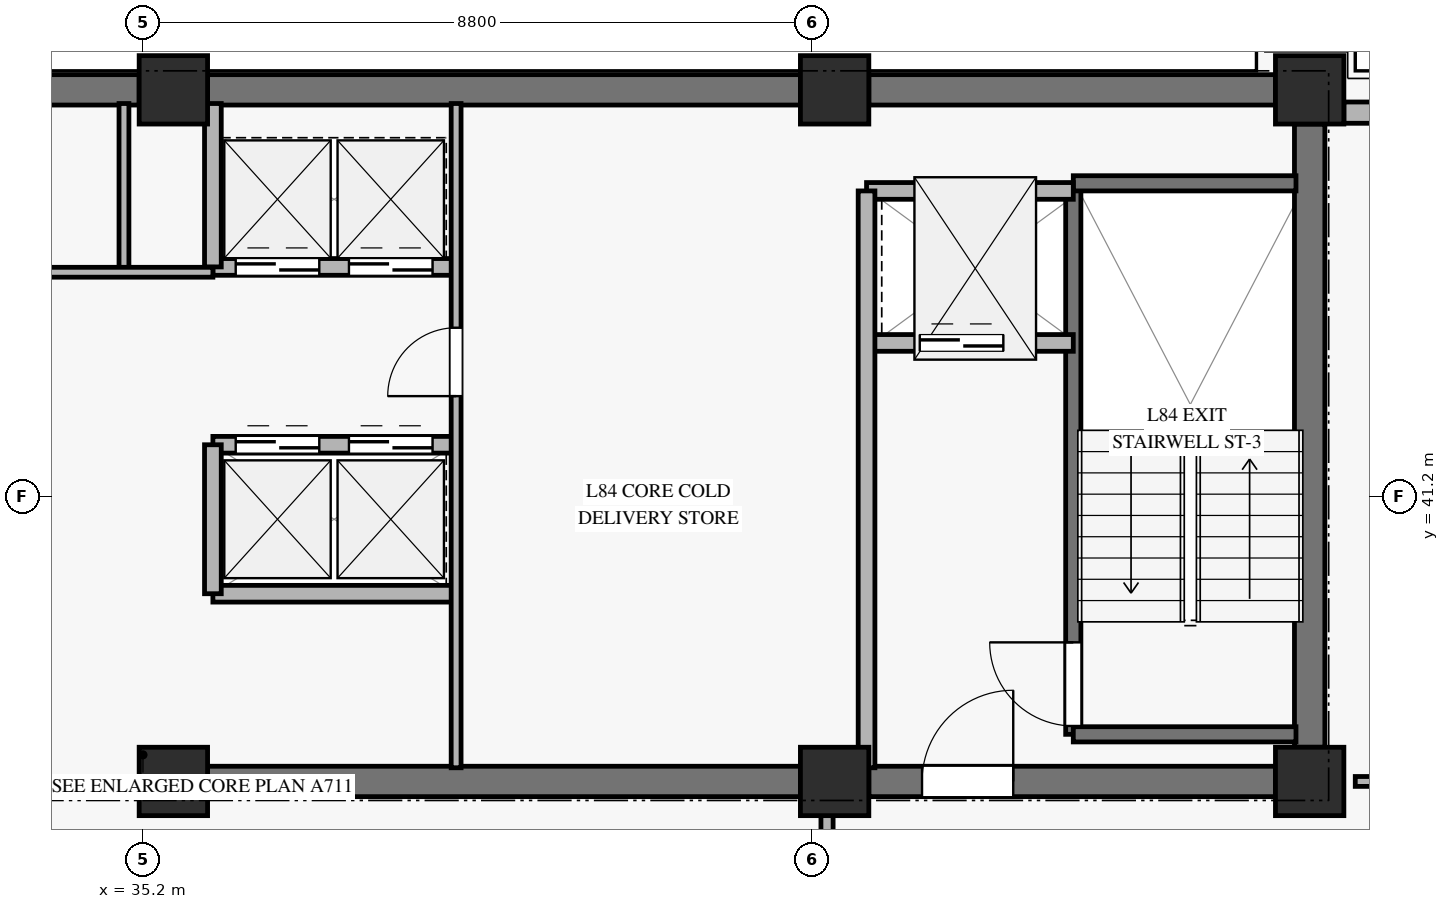
"""IFC4 building model, lengths in metres.
Left out: names, types, materials, properties, quantities, classifications, styles, units other than length and angle.
Written with IfcOpenShell. Run it as: python <this file> out.ifc"""

import sys

from ifc_helpers import new_model, si_unit, direction, frame, frame_2d, origin, origin_2d, place, context, subcontext, project, spatial, rectangle, extrude, source, transform, mapped, element, fill, save


model = new_model("IFC4")
c1 = context("Model", 3, precision=1e-05, world=origin(), true_north=direction((0.0, 1.0)))
c2 = subcontext(c1, "Body", "Model", "MODEL_VIEW")
j1 = project(units=[si_unit("LENGTHUNIT", "METRE"), si_unit("PLANEANGLEUNIT", "RADIAN")], contexts=[c1])
p1 = place(None, origin())
s1 = spatial("IfcSite", under=j1, at=p1, CompositionType="ELEMENT")
p2 = place(p1, origin())
s2 = spatial("IfcBuilding", under=s1, at=p2, CompositionType="ELEMENT")
p3 = place(p2, frame((0.0, 0.0, 324.4)))
s3 = spatial("IfcBuildingStorey", under=s2, at=p3, CompositionType="ELEMENT", Elevation=324.4)
m1 = source(origin(), c2, "Body", "SweptSolid", [
    extrude(rectangle(XDim=0.9, YDim=0.9, at=origin_2d()), origin(), (0.0, 0.0, 1.0), 3.12),
])
for number, where, z_axis, x_axis in (
    (1, (35.6, 37.45, 0.0), (0.0, 0.0, 1.0), (1.0, 0.0, 0.0)),
    (2, (35.6, 46.55, 0.0), (0.0, 0.0, 1.0), (1.0, 0.0, 0.0)),
    (3, (44.3, 37.45, 0.0), (0.0, 0.0, 1.0), (1.0, 0.0, 0.0)),
    (4, (44.3, 46.55, 0.0), (0.0, 0.0, 1.0), (1.0, 0.0, 0.0)),
    (5, (50.55, 37.45, 0.0), (0.0, 0.0, 1.0), (1.0, 0.0, 0.0)),
    (6, (50.55, 46.55, 0.0), (0.0, 0.0, 1.0), (1.0, 0.0, 0.0)),
):
    element("IfcColumn", number, at=place(p3, frame(where, z_axis=z_axis, x_axis=x_axis)), inside=s3, PredefinedType="PILASTER", context=c2, shape_type="MappedRepresentation", body=[
        mapped(m1, transform((0.0, 0.0, 0.0), x_axis=(1.0, 0.0, 0.0), y_axis=(0.0, 1.0, 0.0), z_axis=(0.0, 0.0, 1.0), scale=1.0)),
    ])
p4 = place(p3, frame((31.25, 46.55, 0.0), z_axis=(0.0, 0.0, 1.0), x_axis=(1.0, 0.0, 0.0)))
e7 = element("IfcWall", 7, at=p4, inside=s3, PredefinedType="SHEAR", context=c2, shape_type="SweptSolid", body=[
    extrude(rectangle(XDim=3.9, YDim=0.4, at=frame_2d((1.95, 0.0))), origin(), (0.0, 0.0, 1.0), 3.12),
])
p5 = place(p3, frame((36.05, 46.55, 0.0), z_axis=(0.0, 0.0, 1.0), x_axis=(1.0, 0.0, 0.0)))
e8 = element("IfcWall", 8, at=p5, inside=s3, PredefinedType="SHEAR", context=c2, shape_type="SweptSolid", body=[
    extrude(rectangle(XDim=7.8, YDim=0.4, at=frame_2d((3.9, 0.0))), origin(), (0.0, 0.0, 1.0), 3.12),
])
p6 = place(p3, frame((44.75, 46.55, 0.0), z_axis=(0.0, 0.0, 1.0), x_axis=(1.0, 0.0, 0.0)))
e9 = element("IfcWall", 9, at=p6, inside=s3, PredefinedType="SHEAR", context=c2, shape_type="SweptSolid", body=[
    extrude(rectangle(XDim=5.35, YDim=0.4, at=frame_2d((2.675, 0.0))), origin(), (0.0, 0.0, 1.0), 3.12),
])
p7 = place(p3, frame((36.05, 37.45, 0.0), z_axis=(0.0, 0.0, 1.0), x_axis=(1.0, 0.0, 0.0)))
e10 = element("IfcWall", 10, at=p7, inside=s3, PredefinedType="SHEAR", context=c2, shape_type="SweptSolid", body=[
    extrude(rectangle(XDim=7.8, YDim=0.4, at=frame_2d((3.9, 0.0))), origin(), (0.0, 0.0, 1.0), 3.12),
])
p8 = place(p3, frame((44.75, 37.45, 0.0), z_axis=(0.0, 0.0, 1.0), x_axis=(1.0, 0.0, 0.0)))
e11 = element("IfcWall", 11, at=p8, inside=s3, PredefinedType="SHEAR", context=c2, shape_type="SweptSolid", body=[
    extrude(rectangle(XDim=5.35, YDim=0.4, at=frame_2d((2.675, 0.0))), origin(), (0.0, 0.0, 1.0), 3.12),
])
p9 = place(p8, frame((0.7, 0.0, 0.0)))
e12 = element("IfcOpeningElement", 12, at=p9, cuts=e11, PredefinedType="OPENING", context=c2, shape_type="SweptSolid", body=[
    extrude(rectangle(XDim=1.2, YDim=2.15, at=frame_2d((0.6, 1.075))), frame((0.0, 0.21, 0.0), z_axis=(0.0, -1.0, 0.0), x_axis=(1.0, 0.0, 0.0)), (0.0, 0.0, 1.0), 0.42),
])
p10 = place(p3, frame((50.55, 37.9, 0.0), z_axis=(0.0, 0.0, 1.0), x_axis=(0.0, 1.0, 0.0)))
e13 = element("IfcWall", 13, at=p10, inside=s3, PredefinedType="SHEAR", context=c2, shape_type="SweptSolid", body=[
    extrude(rectangle(XDim=8.2, YDim=0.4, at=frame_2d((4.1, 0.0))), origin(), (0.0, 0.0, 1.0), 3.12),
])
p11 = place(p3, frame((51.0, 46.25, 0.0), z_axis=(0.0, 0.0, 1.0), x_axis=(1.0, 0.0, 0.0)))
e14 = element("IfcWall", 14, at=p11, inside=s3, PredefinedType="SOLIDWALL", context=c2, shape_type="SweptSolid", body=[
    extrude(rectangle(XDim=5.639, YDim=0.28, at=frame_2d((2.819, 0.0))), origin(), (0.0, 0.0, 1.0), 2.75),
])
p12 = place(p11, frame((2.02, 0.0, 0.45)))
e15 = element("IfcOpeningElement", 15, at=p12, cuts=e14, PredefinedType="OPENING", context=c2, shape_type="SweptSolid", body=[
    extrude(rectangle(XDim=1.6, YDim=2.0, at=frame_2d((0.8, 1.0))), frame((0.0, 0.15, 0.0), z_axis=(0.0, -1.0, 0.0), x_axis=(1.0, 0.0, 0.0)), (0.0, 0.0, 1.0), 0.3),
])
p13 = place(p3, frame((47.44, 38.07, 0.0), z_axis=(0.0, 0.0, 1.0), x_axis=(0.0, 1.0, 0.0)))
e16 = element("IfcWall", 16, at=p13, inside=s3, PredefinedType="SOLIDWALL", context=c2, shape_type="SweptSolid", body=[
    extrude(rectangle(XDim=7.25, YDim=0.2, at=frame_2d((3.625, 0.0))), origin(), (0.0, 0.0, 1.0), 3.4),
])
p14 = place(p13, frame((0.11, 0.0, 0.0)))
e17 = element("IfcOpeningElement", 17, at=p14, cuts=e16, PredefinedType="OPENING", context=c2, shape_type="SweptSolid", body=[
    extrude(rectangle(XDim=1.1, YDim=2.15, at=frame_2d((0.55, 1.075))), frame((0.0, 0.11, 0.0), z_axis=(0.0, -1.0, 0.0), x_axis=(1.0, 0.0, 0.0)), (0.0, 0.0, 1.0), 0.22),
])
for number, where, z_axis, x_axis in (
    (18, (47.44, 45.32, 0.0), (0.0, 0.0, 1.0), (1.0, 0.0, 0.0)),
    (19, (47.44, 38.07, 0.0), (0.0, 0.0, 1.0), (1.0, 0.0, 0.0)),
):
    element("IfcWall", number, at=place(p3, frame(where, z_axis=z_axis, x_axis=x_axis)), inside=s3, PredefinedType="SOLIDWALL", context=c2, shape_type="SweptSolid", body=[
        extrude(rectangle(XDim=2.93, YDim=0.2, at=frame_2d((1.465, 0.0))), origin(), (0.0, 0.0, 1.0), 3.4),
    ])
p15 = place(p3, frame((44.72, 43.22, 0.0), z_axis=(0.0, 0.0, 1.0), x_axis=(1.0, 0.0, 0.0)))
e20 = element("IfcWall", 20, at=p15, inside=s3, PredefinedType="SOLIDWALL", context=c2, shape_type="SweptSolid", body=[
    extrude(rectangle(XDim=2.72, YDim=0.22, at=frame_2d((1.36, 0.0))), origin(), (0.0, 0.0, 1.0), 3.12),
])
p16 = place(p15, frame((0.7, 0.0, 0.0)))
e21 = element("IfcOpeningElement", 21, at=p16, cuts=e20, PredefinedType="OPENING", context=c2, shape_type="SweptSolid", body=[
    extrude(rectangle(XDim=1.1, YDim=2.2, at=frame_2d((0.55, 1.1))), frame((0.0, 0.12, 0.0), z_axis=(0.0, -1.0, 0.0), x_axis=(1.0, 0.0, 0.0)), (0.0, 0.0, 1.0), 0.24),
])
p17 = place(p3, frame((44.72, 45.22, 0.0), z_axis=(0.0, 0.0, 1.0), x_axis=(1.0, 0.0, 0.0)))
e22 = element("IfcWall", 22, at=p17, inside=s3, PredefinedType="SOLIDWALL", context=c2, shape_type="SweptSolid", body=[
    extrude(rectangle(XDim=2.72, YDim=0.22, at=frame_2d((1.36, 0.0))), origin(), (0.0, 0.0, 1.0), 3.12),
])
p18 = place(p3, frame((44.72, 37.63, 0.0), z_axis=(0.0, 0.0, 1.0), x_axis=(0.0, 1.0, 0.0)))
e23 = element("IfcWall", 23, at=p18, inside=s3, PredefinedType="SOLIDWALL", context=c2, shape_type="SweptSolid", body=[
    extrude(rectangle(XDim=7.59, YDim=0.22, at=frame_2d((3.795, 0.0))), origin(), (0.0, 0.0, 1.0), 3.12),
])
p19 = place(p3, frame((36.12, 44.22, 0.0), z_axis=(0.0, 0.0, 1.0), x_axis=(1.0, 0.0, 0.0)))
e24 = element("IfcWall", 24, at=p19, inside=s3, PredefinedType="SOLIDWALL", context=c2, shape_type="SweptSolid", body=[
    extrude(rectangle(XDim=3.2, YDim=0.22, at=frame_2d((1.6, 0.0))), origin(), (0.0, 0.0, 1.0), 3.12),
])
p20 = place(p19, frame((0.3, 0.0, 0.0)))
e25 = element("IfcOpeningElement", 25, at=p20, cuts=e24, PredefinedType="OPENING", context=c2, shape_type="SweptSolid", body=[
    extrude(rectangle(XDim=1.1, YDim=2.2, at=frame_2d((0.55, 1.1))), frame((0.0, 0.12, 0.0), z_axis=(0.0, -1.0, 0.0), x_axis=(1.0, 0.0, 0.0)), (0.0, 0.0, 1.0), 0.24),
])
p21 = place(p19, frame((1.79, 0.0, 0.0)))
e26 = element("IfcOpeningElement", 26, at=p21, cuts=e24, PredefinedType="OPENING", context=c2, shape_type="SweptSolid", body=[
    extrude(rectangle(XDim=1.1, YDim=2.2, at=frame_2d((0.55, 1.1))), frame((0.0, 0.12, 0.0), z_axis=(0.0, -1.0, 0.0), x_axis=(1.0, 0.0, 0.0)), (0.0, 0.0, 1.0), 0.24),
])
p22 = place(p3, frame((36.12, 41.88, 0.0), z_axis=(0.0, 0.0, 1.0), x_axis=(1.0, 0.0, 0.0)))
e27 = element("IfcWall", 27, at=p22, inside=s3, PredefinedType="SOLIDWALL", context=c2, shape_type="SweptSolid", body=[
    extrude(rectangle(XDim=3.2, YDim=0.22, at=frame_2d((1.6, 0.0))), origin(), (0.0, 0.0, 1.0), 3.12),
])
p23 = place(p22, frame((0.3, 0.0, 0.0)))
e28 = element("IfcOpeningElement", 28, at=p23, cuts=e27, PredefinedType="OPENING", context=c2, shape_type="SweptSolid", body=[
    extrude(rectangle(XDim=1.1, YDim=2.2, at=frame_2d((0.55, 1.1))), frame((0.0, 0.12, 0.0), z_axis=(0.0, -1.0, 0.0), x_axis=(1.0, 0.0, 0.0)), (0.0, 0.0, 1.0), 0.24),
])
p24 = place(p22, frame((1.79, 0.0, 0.0)))
e29 = element("IfcOpeningElement", 29, at=p24, cuts=e27, PredefinedType="OPENING", context=c2, shape_type="SweptSolid", body=[
    extrude(rectangle(XDim=1.1, YDim=2.2, at=frame_2d((0.55, 1.1))), frame((0.0, 0.12, 0.0), z_axis=(0.0, -1.0, 0.0), x_axis=(1.0, 0.0, 0.0)), (0.0, 0.0, 1.0), 0.24),
])
p25 = place(p3, frame((36.12, 39.92, 0.0), z_axis=(0.0, 0.0, 1.0), x_axis=(1.0, 0.0, 0.0)))
e30 = element("IfcWall", 30, at=p25, inside=s3, PredefinedType="SOLIDWALL", context=c2, shape_type="SweptSolid", body=[
    extrude(rectangle(XDim=3.2, YDim=0.22, at=frame_2d((1.6, 0.0))), origin(), (0.0, 0.0, 1.0), 3.12),
])
p26 = place(p3, frame((36.12, 39.92, 0.0), z_axis=(0.0, 0.0, 1.0), x_axis=(0.0, 1.0, 0.0)))
e31 = element("IfcWall", 31, at=p26, inside=s3, PredefinedType="SOLIDWALL", context=c2, shape_type="SweptSolid", body=[
    extrude(rectangle(XDim=1.96, YDim=0.22, at=frame_2d((0.98, 0.0))), origin(), (0.0, 0.0, 1.0), 3.12),
])
p27 = place(p3, frame((36.12, 44.22, 0.0), z_axis=(0.0, 0.0, 1.0), x_axis=(0.0, 1.0, 0.0)))
e32 = element("IfcWall", 32, at=p27, inside=s3, PredefinedType="SOLIDWALL", context=c2, shape_type="SweptSolid", body=[
    extrude(rectangle(XDim=2.15, YDim=0.22, at=frame_2d((1.075, 0.0))), origin(), (0.0, 0.0, 1.0), 3.12),
])
p28 = place(p3, frame((34.95, 44.15, 0.0), z_axis=(0.0, 0.0, 1.0), x_axis=(0.0, 1.0, 0.0)))
e33 = element("IfcWall", 33, at=p28, inside=s3, PredefinedType="PARTITIONING", context=c2, shape_type="SweptSolid", body=[
    extrude(rectangle(XDim=2.22, YDim=0.13, at=frame_2d((1.11, 0.0))), origin(), (0.0, 0.0, 1.0), 3.12),
])
p29 = place(p3, frame((33.18, 44.15, 0.0), z_axis=(0.0, 0.0, 1.0), x_axis=(1.0, 0.0, 0.0)))
e34 = element("IfcWall", 34, at=p29, inside=s3, PredefinedType="PARTITIONING", context=c2, shape_type="SweptSolid", body=[
    extrude(rectangle(XDim=2.94, YDim=0.13, at=frame_2d((1.47, 0.0))), origin(), (0.0, 0.0, 1.0), 2.405),
])
p30 = place(p3, frame((39.32, 37.63, 0.0), z_axis=(0.0, 0.0, 1.0), x_axis=(0.0, 1.0, 0.0)))
e35 = element("IfcWall", 35, at=p30, inside=s3, PredefinedType="PARTITIONING", context=c2, shape_type="SweptSolid", body=[
    extrude(rectangle(XDim=8.74, YDim=0.13, at=frame_2d((4.37, 0.0))), origin(), (0.0, 0.0, 1.0), 3.12),
])
p31 = place(p30, frame((4.89, 0.0, 0.0)))
e36 = element("IfcOpeningElement", 36, at=p31, cuts=e35, PredefinedType="OPENING", context=c2, shape_type="SweptSolid", body=[
    extrude(rectangle(XDim=0.9, YDim=2.1, at=frame_2d((0.45, 1.05))), frame((0.0, 0.075, 0.0), z_axis=(0.0, -1.0, 0.0), x_axis=(1.0, 0.0, 0.0)), (0.0, 0.0, 1.0), 0.15),
])
p32 = place(p3, frame((44.2, 21.636, 0.0), z_axis=(0.0, 0.0, 1.0), x_axis=(0.0, 1.0, 0.0)))
e37 = element("IfcWall", 37, at=p32, inside=s3, PredefinedType="PARTITIONING", context=c2, shape_type="SweptSolid", body=[
    extrude(rectangle(XDim=15.814, YDim=0.16, at=frame_2d((7.907, 0.0))), origin(), (0.0, 0.0, 1.0), 2.405),
])
p33 = place(p32, frame((13.934, 0.0, 0.0)))
e38 = element("IfcOpeningElement", 38, at=p33, cuts=e37, PredefinedType="OPENING", context=c2, shape_type="SweptSolid", body=[
    extrude(rectangle(XDim=1.05, YDim=2.15, at=frame_2d((0.525, 1.075))), frame((0.0, 0.09, 0.0), z_axis=(0.0, -1.0, 0.0), x_axis=(1.0, 0.0, 0.0)), (0.0, 0.0, 1.0), 0.18),
])
p34 = place(p3, frame((51.15, 37.45, 0.0), z_axis=(0.0, 0.0, 1.0), x_axis=(1.0, 0.0, 0.0)))
e39 = element("IfcWall", 39, at=p34, inside=s3, PredefinedType="PARTITIONING", context=c2, shape_type="SweptSolid", body=[
    extrude(rectangle(XDim=7.981, YDim=0.13, at=frame_2d((3.991, 0.0))), origin(), (0.0, 0.0, 1.0), 2.755),
])
p35 = place(p34, frame((0.5, 0.0, 0.0)))
e40 = element("IfcOpeningElement", 40, at=p35, cuts=e39, PredefinedType="OPENING", context=c2, shape_type="SweptSolid", body=[
    extrude(rectangle(XDim=0.9, YDim=2.1, at=frame_2d((0.45, 1.05))), frame((0.0, 0.075, 0.0), z_axis=(0.0, -1.0, 0.0), x_axis=(1.0, 0.0, 0.0)), (0.0, 0.0, 1.0), 0.15),
])
p36 = place(p34, frame((6.027, 0.0, 0.0)))
e41 = element("IfcOpeningElement", 41, at=p36, cuts=e39, PredefinedType="OPENING", context=c2, shape_type="SweptSolid", body=[
    extrude(rectangle(XDim=0.95, YDim=2.1, at=frame_2d((0.475, 1.05))), frame((0.0, 0.075, 0.0), z_axis=(0.0, -1.0, 0.0), x_axis=(1.0, 0.0, 0.0)), (0.0, 0.0, 1.0), 0.15),
])
m2 = source(origin(), c2, "Body", "SweptSolid", [
    extrude(rectangle(XDim=1.1, YDim=2.15, at=frame_2d((0.55, 1.075))), frame((0.0, 0.025, 0.0), z_axis=(0.0, -1.0, 0.0), x_axis=(1.0, 0.0, 0.0)), (0.0, 0.0, 1.0), 0.05),
])
p37 = place(p14, origin())
e42 = element("IfcDoor", 42, at=p37, inside=s3, OperationType="SINGLE_SWING_RIGHT", PredefinedType="DOOR", context=c2, shape_type="MappedRepresentation", body=[
    mapped(m2, transform((0.0, 0.0, 0.0), x_axis=(1.0, 0.0, 0.0), y_axis=(0.0, 1.0, 0.0), z_axis=(0.0, 0.0, 1.0), scale=1.0)),
])
fill(e17, e42)
m3 = source(origin(), c2, "Body", "SweptSolid", [
    extrude(rectangle(XDim=1.1, YDim=2.2, at=frame_2d((0.55, 1.1))), frame((0.0, 0.025, 0.0), z_axis=(0.0, -1.0, 0.0), x_axis=(1.0, 0.0, 0.0)), (0.0, 0.0, 1.0), 0.05),
])
p38 = place(p16, origin())
e43 = element("IfcDoor", 43, at=p38, inside=s3, OperationType="SLIDING_TO_LEFT", PredefinedType="DOOR", context=c2, shape_type="MappedRepresentation", body=[
    mapped(m3, transform((0.0, 0.0, 0.0), x_axis=(1.0, 0.0, 0.0), y_axis=(0.0, 1.0, 0.0), z_axis=(0.0, 0.0, 1.0), scale=1.0)),
])
fill(e21, e43)
m4 = source(origin(), c2, "Body", "SweptSolid", [
    extrude(rectangle(XDim=1.2, YDim=2.15, at=frame_2d((0.6, 1.075))), frame((0.0, 0.025, 0.0), z_axis=(0.0, -1.0, 0.0), x_axis=(1.0, 0.0, 0.0)), (0.0, 0.0, 1.0), 0.05),
])
p39 = place(p9, origin())
e44 = element("IfcDoor", 44, at=p39, inside=s3, OperationType="SINGLE_SWING_RIGHT", PredefinedType="DOOR", context=c2, shape_type="MappedRepresentation", body=[
    mapped(m4, transform((0.0, 0.0, 0.0), x_axis=(1.0, 0.0, 0.0), y_axis=(0.0, 1.0, 0.0), z_axis=(0.0, 0.0, 1.0), scale=1.0)),
])
fill(e12, e44)
p40 = place(p20, origin())
e45 = element("IfcDoor", 45, at=p40, inside=s3, OperationType="SLIDING_TO_LEFT", PredefinedType="DOOR", context=c2, shape_type="MappedRepresentation", body=[
    mapped(m3, transform((0.0, 0.0, 0.0), x_axis=(1.0, 0.0, 0.0), y_axis=(0.0, 1.0, 0.0), z_axis=(0.0, 0.0, 1.0), scale=1.0)),
])
fill(e25, e45)
p41 = place(p21, origin())
e46 = element("IfcDoor", 46, at=p41, inside=s3, OperationType="SLIDING_TO_LEFT", PredefinedType="DOOR", context=c2, shape_type="MappedRepresentation", body=[
    mapped(m3, transform((0.0, 0.0, 0.0), x_axis=(1.0, 0.0, 0.0), y_axis=(0.0, 1.0, 0.0), z_axis=(0.0, 0.0, 1.0), scale=1.0)),
])
fill(e26, e46)
p42 = place(p23, origin())
e47 = element("IfcDoor", 47, at=p42, inside=s3, OperationType="SLIDING_TO_LEFT", PredefinedType="DOOR", context=c2, shape_type="MappedRepresentation", body=[
    mapped(m3, transform((0.0, 0.0, 0.0), x_axis=(1.0, 0.0, 0.0), y_axis=(0.0, 1.0, 0.0), z_axis=(0.0, 0.0, 1.0), scale=1.0)),
])
fill(e28, e47)
p43 = place(p24, origin())
e48 = element("IfcDoor", 48, at=p43, inside=s3, OperationType="SLIDING_TO_LEFT", PredefinedType="DOOR", context=c2, shape_type="MappedRepresentation", body=[
    mapped(m3, transform((0.0, 0.0, 0.0), x_axis=(1.0, 0.0, 0.0), y_axis=(0.0, 1.0, 0.0), z_axis=(0.0, 0.0, 1.0), scale=1.0)),
])
fill(e29, e48)
m5 = source(origin(), c2, "Body", "SweptSolid", [
    extrude(rectangle(XDim=0.9, YDim=2.1, at=frame_2d((0.45, 1.05))), frame((0.0, 0.025, 0.0), z_axis=(0.0, -1.0, 0.0), x_axis=(1.0, 0.0, 0.0)), (0.0, 0.0, 1.0), 0.05),
])
p44 = place(p31, origin())
e49 = element("IfcDoor", 49, at=p44, inside=s3, OperationType="SINGLE_SWING_LEFT", PredefinedType="DOOR", context=c2, shape_type="MappedRepresentation", body=[
    mapped(m5, transform((0.0, 0.0, 0.0), x_axis=(1.0, 0.0, 0.0), y_axis=(0.0, 1.0, 0.0), z_axis=(0.0, 0.0, 1.0), scale=1.0)),
])
fill(e36, e49)
save(model, sys.argv[1])
